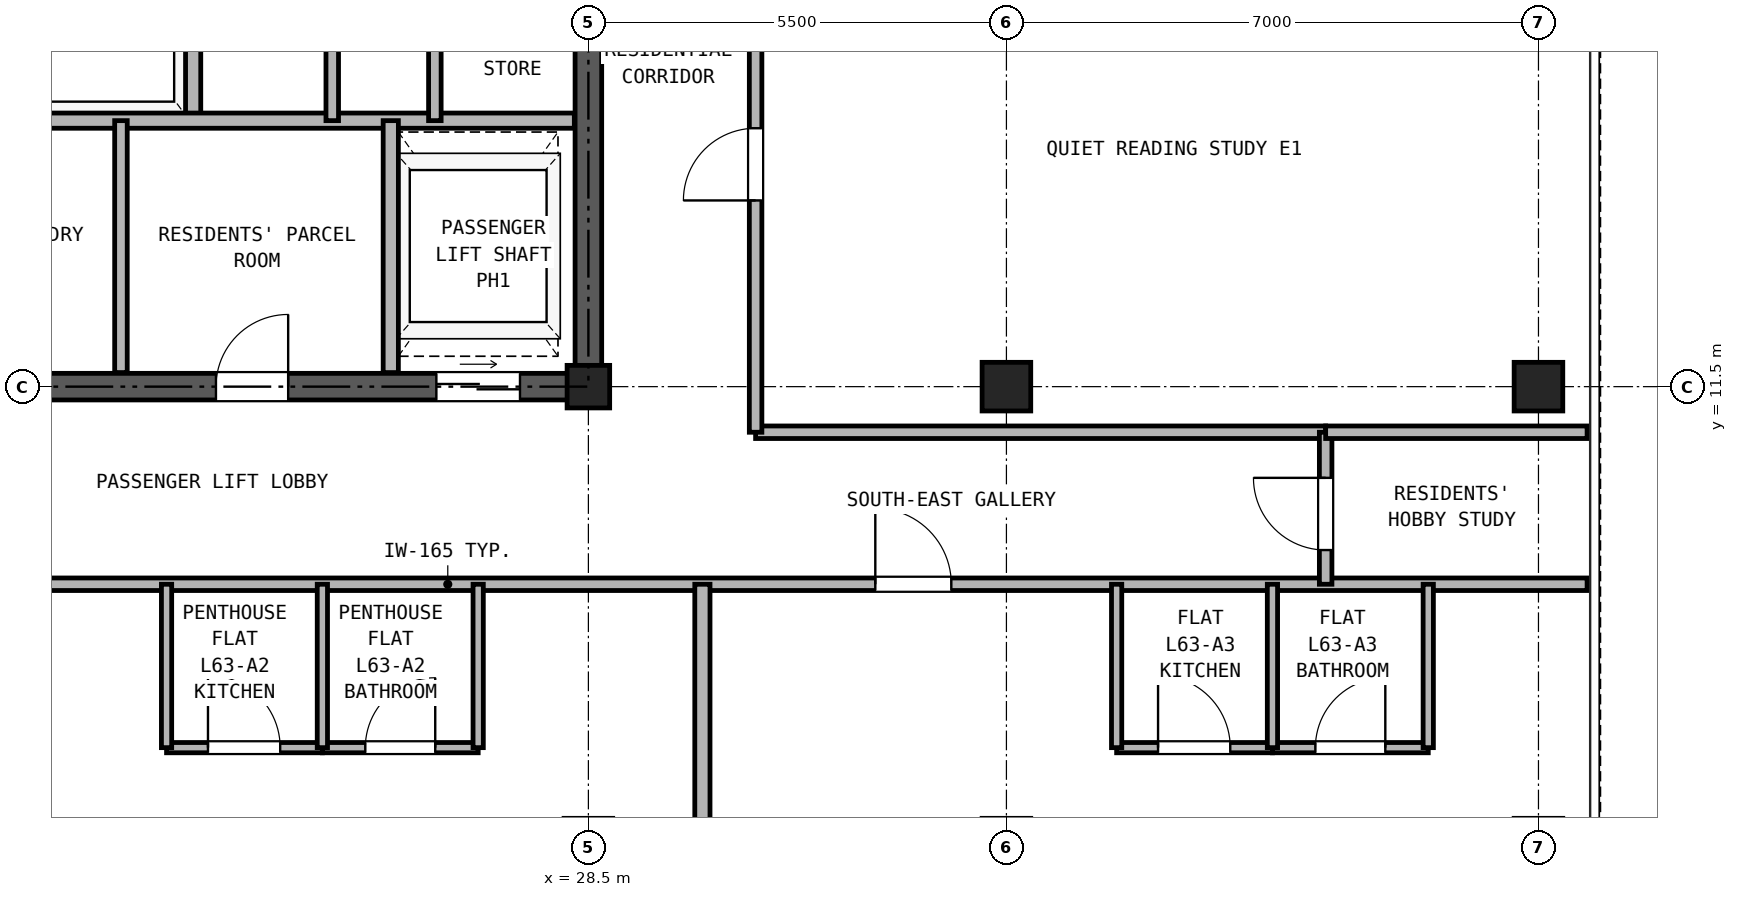
"""IFC4 building model, lengths in metres.
Left out: names, types, materials, properties, quantities, classifications, styles, units other than length and angle.
Written with IfcOpenShell. Run it as: python <this file> out.ifc"""

import sys

from ifc_helpers import new_model, si_unit, direction, frame, frame_2d, origin, origin_2d, place, context, subcontext, project, spatial, rectangle, hollow_rectangle, extrude, source, transform, mapped, element, fill, save


model = new_model("IFC4")
c1 = context("Model", 3, precision=1e-05, world=origin(), true_north=direction((0.0, 1.0)))
c2 = subcontext(c1, "Body", "Model", "MODEL_VIEW")
j1 = project(units=[si_unit("LENGTHUNIT", "METRE"), si_unit("PLANEANGLEUNIT", "RADIAN")], contexts=[c1])
p1 = place(None, origin())
s1 = spatial("IfcSite", under=j1, at=p1, CompositionType="ELEMENT")
p2 = place(p1, origin())
s2 = spatial("IfcBuilding", under=s1, at=p2, CompositionType="ELEMENT")
p3 = place(p2, frame((0.0, 0.0, 223.3)))
s3 = spatial("IfcBuildingStorey", under=s2, at=p3, CompositionType="ELEMENT", Elevation=223.3)
m1 = source(origin(), c2, "Body", "SweptSolid", [
    extrude(hollow_rectangle(XDim=0.64, YDim=0.64, WallThickness=0.035, at=origin_2d()), origin(), (0.0, 0.0, 1.0), 2.98),
])
p4 = place(p3, frame((41.0, 11.5, 0.0), z_axis=(0.0, 0.0, 1.0), x_axis=(1.0, 0.0, 0.0)))
e1 = element("IfcColumn", 1, at=p4, inside=s3, PredefinedType="COLUMN", context=c2, shape_type="MappedRepresentation", body=[
    mapped(m1, transform((0.0, 0.0, 0.0), x_axis=(1.0, 0.0, 0.0), y_axis=(0.0, 1.0, 0.0), z_axis=(0.0, 0.0, 1.0), scale=1.0)),
])
m2 = source(origin(), c2, "Body", "SweptSolid", [
    extrude(hollow_rectangle(XDim=0.56, YDim=0.56, WallThickness=0.03, at=origin_2d()), origin(), (0.0, 0.0, 1.0), 2.98),
])
p5 = place(p3, frame((28.5, 11.5, 0.0), z_axis=(0.0, 0.0, 1.0), x_axis=(1.0, 0.0, 0.0)))
e2 = element("IfcColumn", 2, at=p5, inside=s3, PredefinedType="COLUMN", context=c2, shape_type="MappedRepresentation", body=[
    mapped(m2, transform((0.0, 0.0, 0.0), x_axis=(1.0, 0.0, 0.0), y_axis=(0.0, 1.0, 0.0), z_axis=(0.0, 0.0, 1.0), scale=1.0)),
])
p6 = place(p3, frame((34.0, 11.5, 0.0), z_axis=(0.0, 0.0, 1.0), x_axis=(1.0, 0.0, 0.0)))
e3 = element("IfcColumn", 3, at=p6, inside=s3, PredefinedType="COLUMN", context=c2, shape_type="MappedRepresentation", body=[
    mapped(m1, transform((0.0, 0.0, 0.0), x_axis=(1.0, 0.0, 0.0), y_axis=(0.0, 1.0, 0.0), z_axis=(0.0, 0.0, 1.0), scale=1.0)),
])
p7 = place(p3, frame((18.325, 11.5, 0.0), z_axis=(0.0, 0.0, 1.0), x_axis=(1.0, 0.0, 0.0)))
e4 = element("IfcWall", 4, at=p7, inside=s3, PredefinedType="SHEAR", context=c2, shape_type="SweptSolid", body=[
    extrude(rectangle(XDim=10.35, YDim=0.35, at=frame_2d((5.175, 0.0))), origin(), (0.0, 0.0, 1.0), 2.98),
])
p8 = place(p7, frame((1.775, 0.0, 0.0)))
e5 = element("IfcOpeningElement", 5, at=p8, cuts=e4, PredefinedType="OPENING", context=c2, shape_type="SweptSolid", body=[
    extrude(rectangle(XDim=0.95, YDim=2.15, at=frame_2d((0.475, 1.075))), frame((0.0, 0.185, 0.0), z_axis=(0.0, -1.0, 0.0), x_axis=(1.0, 0.0, 0.0)), (0.0, 0.0, 1.0), 0.37),
])
p9 = place(p7, frame((5.275, 0.0, 0.0)))
e6 = element("IfcOpeningElement", 6, at=p9, cuts=e4, PredefinedType="OPENING", context=c2, shape_type="SweptSolid", body=[
    extrude(rectangle(XDim=0.95, YDim=2.15, at=frame_2d((0.475, 1.075))), frame((0.0, 0.185, 0.0), z_axis=(0.0, -1.0, 0.0), x_axis=(1.0, 0.0, 0.0)), (0.0, 0.0, 1.0), 0.37),
])
p10 = place(p7, frame((8.175, 0.0, 0.0)))
e7 = element("IfcOpeningElement", 7, at=p10, cuts=e4, PredefinedType="OPENING", context=c2, shape_type="SweptSolid", body=[
    extrude(rectangle(XDim=1.1, YDim=2.25, at=frame_2d((0.55, 1.125))), frame((0.0, 0.185, 0.0), z_axis=(0.0, -1.0, 0.0), x_axis=(1.0, 0.0, 0.0)), (0.0, 0.0, 1.0), 0.37),
])
p11 = place(p3, frame((28.5, 11.675, 0.0), z_axis=(0.0, 0.0, 1.0), x_axis=(0.0, 1.0, 0.0)))
e8 = element("IfcWall", 8, at=p11, inside=s3, PredefinedType="SHEAR", context=c2, shape_type="SweptSolid", body=[
    extrude(rectangle(XDim=16.9, YDim=0.35, at=frame_2d((8.45, 0.0))), origin(), (0.0, 0.0, 1.0), 2.98),
])
p12 = place(p11, frame((7.475, 0.0, 0.0)))
e9 = element("IfcOpeningElement", 9, at=p12, cuts=e8, PredefinedType="OPENING", context=c2, shape_type="SweptSolid", body=[
    extrude(rectangle(XDim=1.15, YDim=2.2, at=frame_2d((0.575, 1.1))), frame((0.0, 0.185, 0.0), z_axis=(0.0, -1.0, 0.0), x_axis=(1.0, 0.0, 0.0)), (0.0, 0.0, 1.0), 0.37),
])
p13 = place(p3, frame((23.3, 15.0, 0.0), z_axis=(0.0, 0.0, 1.0), x_axis=(0.0, 1.0, 0.0)))
e10 = element("IfcWall", 10, at=p13, inside=s3, PredefinedType="PARTITIONING", context=c2, shape_type="SweptSolid", body=[
    extrude(rectangle(XDim=3.0, YDim=0.2, at=frame_2d((1.5, 0.0))), origin(), (0.0, 0.0, 1.0), 2.98),
])
p14 = place(p3, frame((18.685, 15.0, 0.0), z_axis=(0.0, 0.0, 1.0), x_axis=(1.0, 0.0, 0.0)))
e11 = element("IfcWall", 11, at=p14, inside=s3, PredefinedType="PARTITIONING", context=c2, shape_type="SweptSolid", body=[
    extrude(rectangle(XDim=9.63, YDim=0.2, at=frame_2d((4.815, 0.0))), origin(), (0.0, 0.0, 1.0), 2.98),
])
p15 = place(p3, frame((25.13, 15.0, 0.0), z_axis=(0.0, 0.0, 1.0), x_axis=(0.0, 1.0, 0.0)))
e12 = element("IfcWall", 12, at=p15, inside=s3, PredefinedType="PARTITIONING", context=c2, shape_type="SweptSolid", body=[
    extrude(rectangle(XDim=3.0, YDim=0.165, at=frame_2d((1.5, 0.0))), origin(), (0.0, 0.0, 1.0), 2.98),
])
p16 = place(p3, frame((26.48, 15.0, 0.0), z_axis=(0.0, 0.0, 1.0), x_axis=(0.0, 1.0, 0.0)))
e13 = element("IfcWall", 13, at=p16, inside=s3, PredefinedType="PARTITIONING", context=c2, shape_type="SweptSolid", body=[
    extrude(rectangle(XDim=3.0, YDim=0.165, at=frame_2d((1.5, 0.0))), origin(), (0.0, 0.0, 1.0), 2.98),
])
p17 = place(p16, frame((1.05, 0.0, 0.0)))
e14 = element("IfcOpeningElement", 14, at=p17, cuts=e13, PredefinedType="OPENING", context=c2, shape_type="SweptSolid", body=[
    extrude(rectangle(XDim=0.9, YDim=2.05, at=frame_2d((0.45, 1.025))), frame((0.0, 0.093, 0.0), z_axis=(0.0, -1.0, 0.0), x_axis=(1.0, 0.0, 0.0)), (0.0, 0.0, 1.0), 0.185),
])
p18 = place(p3, frame((22.35, 11.685, 0.0), z_axis=(0.0, 0.0, 1.0), x_axis=(0.0, 1.0, 0.0)))
e15 = element("IfcWall", 15, at=p18, inside=s3, PredefinedType="PARTITIONING", context=c2, shape_type="SweptSolid", body=[
    extrude(rectangle(XDim=3.315, YDim=0.165, at=frame_2d((1.657, 0.0))), origin(), (0.0, 0.0, 1.0), 2.98),
])
p19 = place(p3, frame((25.9, 11.685, 0.0), z_axis=(0.0, 0.0, 1.0), x_axis=(0.0, 1.0, 0.0)))
e16 = element("IfcWall", 16, at=p19, inside=s3, PredefinedType="PARTITIONING", context=c2, shape_type="SweptSolid", body=[
    extrude(rectangle(XDim=3.315, YDim=0.2, at=frame_2d((1.657, 0.0))), origin(), (0.0, 0.0, 1.0), 2.98),
])
p20 = place(p3, frame((5.36, 8.9, 0.0), z_axis=(0.0, 0.0, 1.0), x_axis=(1.0, 0.0, 0.0)))
e17 = element("IfcWall", 17, at=p20, inside=s3, PredefinedType="PARTITIONING", context=c2, shape_type="SweptSolid", body=[
    extrude(rectangle(XDim=36.28, YDim=0.165, at=frame_2d((18.14, 0.0))), origin(), (0.0, 0.0, 1.0), 2.98),
])
p21 = place(p20, frame((8.865, 0.0, 0.0)))
e18 = element("IfcOpeningElement", 18, at=p21, cuts=e17, PredefinedType="OPENING", context=c2, shape_type="SweptSolid", body=[
    extrude(rectangle(XDim=1.0, YDim=2.15, at=frame_2d((0.5, 1.075))), frame((0.0, 0.093, 0.0), z_axis=(0.0, -1.0, 0.0), x_axis=(1.0, 0.0, 0.0)), (0.0, 0.0, 1.0), 0.185),
])
p22 = place(p20, frame((14.665, 0.0, 0.0)))
e19 = element("IfcOpeningElement", 19, at=p22, cuts=e17, PredefinedType="OPENING", context=c2, shape_type="SweptSolid", body=[
    extrude(rectangle(XDim=1.0, YDim=2.15, at=frame_2d((0.5, 1.075))), frame((0.0, 0.093, 0.0), z_axis=(0.0, -1.0, 0.0), x_axis=(1.0, 0.0, 0.0)), (0.0, 0.0, 1.0), 0.185),
])
p23 = place(p20, frame((26.915, 0.0, 0.0)))
e20 = element("IfcOpeningElement", 20, at=p23, cuts=e17, PredefinedType="OPENING", context=c2, shape_type="SweptSolid", body=[
    extrude(rectangle(XDim=1.0, YDim=2.15, at=frame_2d((0.5, 1.075))), frame((0.0, 0.093, 0.0), z_axis=(0.0, -1.0, 0.0), x_axis=(1.0, 0.0, 0.0)), (0.0, 0.0, 1.0), 0.185),
])
p24 = place(p3, frame((30.7, 10.9, 0.0), z_axis=(0.0, 0.0, 1.0), x_axis=(1.0, 0.0, 0.0)))
e21 = element("IfcWall", 21, at=p24, inside=s3, PredefinedType="PARTITIONING", context=c2, shape_type="SweptSolid", body=[
    extrude(rectangle(XDim=7.5, YDim=0.165, at=frame_2d((3.75, 0.0))), origin(), (0.0, 0.0, 1.0), 2.98),
])
p25 = place(p3, frame((38.2, 8.9, 0.0), z_axis=(0.0, 0.0, 1.0), x_axis=(0.0, 1.0, 0.0)))
e22 = element("IfcWall", 22, at=p25, inside=s3, PredefinedType="PARTITIONING", context=c2, shape_type="SweptSolid", body=[
    extrude(rectangle(XDim=2.0, YDim=0.165, at=frame_2d((1.0, 0.0))), origin(), (0.0, 0.0, 1.0), 2.98),
])
p26 = place(p25, frame((0.45, 0.0, 0.0)))
e23 = element("IfcOpeningElement", 23, at=p26, cuts=e22, PredefinedType="OPENING", context=c2, shape_type="SweptSolid", body=[
    extrude(rectangle(XDim=0.95, YDim=2.15, at=frame_2d((0.475, 1.075))), frame((0.0, 0.093, 0.0), z_axis=(0.0, -1.0, 0.0), x_axis=(1.0, 0.0, 0.0)), (0.0, 0.0, 1.0), 0.185),
])
p27 = place(p3, frame((30.7, 10.9, 0.0), z_axis=(0.0, 0.0, 1.0), x_axis=(0.0, 1.0, 0.0)))
e24 = element("IfcWall", 24, at=p27, inside=s3, PredefinedType="PARTITIONING", context=c2, shape_type="SweptSolid", body=[
    extrude(rectangle(XDim=24.24, YDim=0.165, at=frame_2d((12.12, 0.0))), origin(), (0.0, 0.0, 1.0), 2.98),
])
p28 = place(p27, frame((3.05, 0.0, 0.0)))
e25 = element("IfcOpeningElement", 25, at=p28, cuts=e24, PredefinedType="OPENING", context=c2, shape_type="SweptSolid", body=[
    extrude(rectangle(XDim=0.95, YDim=2.15, at=frame_2d((0.475, 1.075))), frame((0.0, 0.093, 0.0), z_axis=(0.0, -1.0, 0.0), x_axis=(1.0, 0.0, 0.0)), (0.0, 0.0, 1.0), 0.185),
])
p29 = place(p27, frame((9.85, 0.0, 0.0)))
e26 = element("IfcOpeningElement", 26, at=p29, cuts=e24, PredefinedType="OPENING", context=c2, shape_type="SweptSolid", body=[
    extrude(rectangle(XDim=0.95, YDim=2.15, at=frame_2d((0.475, 1.075))), frame((0.0, 0.093, 0.0), z_axis=(0.0, -1.0, 0.0), x_axis=(1.0, 0.0, 0.0)), (0.0, 0.0, 1.0), 0.185),
])
p30 = place(p27, frame((15.95, 0.0, 0.0)))
e27 = element("IfcOpeningElement", 27, at=p30, cuts=e24, PredefinedType="OPENING", context=c2, shape_type="SweptSolid", body=[
    extrude(rectangle(XDim=0.95, YDim=2.15, at=frame_2d((0.475, 1.075))), frame((0.0, 0.093, 0.0), z_axis=(0.0, -1.0, 0.0), x_axis=(1.0, 0.0, 0.0)), (0.0, 0.0, 1.0), 0.185),
])
p31 = place(p27, frame((21.27, 0.0, 0.0)))
e28 = element("IfcOpeningElement", 28, at=p31, cuts=e24, PredefinedType="OPENING", context=c2, shape_type="SweptSolid", body=[
    extrude(rectangle(XDim=0.95, YDim=2.15, at=frame_2d((0.475, 1.075))), frame((0.0, 0.093, 0.0), z_axis=(0.0, -1.0, 0.0), x_axis=(1.0, 0.0, 0.0)), (0.0, 0.0, 1.0), 0.185),
])
p32 = place(p3, frame((22.95, 6.75, 0.0), z_axis=(0.0, 0.0, 1.0), x_axis=(1.0, 0.0, 0.0)))
e29 = element("IfcWall", 29, at=p32, inside=s3, PredefinedType="PARTITIONING", context=c2, shape_type="SweptSolid", body=[
    extrude(rectangle(XDim=2.05, YDim=0.135, at=frame_2d((1.025, 0.0))), origin(), (0.0, 0.0, 1.0), 2.98),
])
p33 = place(p32, frame((0.545, 0.0, 0.0)))
e30 = element("IfcOpeningElement", 30, at=p33, cuts=e29, PredefinedType="OPENING", context=c2, shape_type="SweptSolid", body=[
    extrude(rectangle(XDim=0.95, YDim=2.15, at=frame_2d((0.475, 1.075))), frame((0.0, 0.077, 0.0), z_axis=(0.0, -1.0, 0.0), x_axis=(1.0, 0.0, 0.0)), (0.0, 0.0, 1.0), 0.155),
])
p34 = place(p3, frame((25.0, 6.75, 0.0), z_axis=(0.0, 0.0, 1.0), x_axis=(1.0, 0.0, 0.0)))
e31 = element("IfcWall", 31, at=p34, inside=s3, PredefinedType="PARTITIONING", context=c2, shape_type="SweptSolid", body=[
    extrude(rectangle(XDim=2.05, YDim=0.135, at=frame_2d((1.025, 0.0))), origin(), (0.0, 0.0, 1.0), 2.98),
])
p35 = place(p34, frame((0.565, 0.0, 0.0)))
e32 = element("IfcOpeningElement", 32, at=p35, cuts=e31, PredefinedType="OPENING", context=c2, shape_type="SweptSolid", body=[
    extrude(rectangle(XDim=0.92, YDim=2.1, at=frame_2d((0.46, 1.05))), frame((0.0, 0.077, 0.0), z_axis=(0.0, -1.0, 0.0), x_axis=(1.0, 0.0, 0.0)), (0.0, 0.0, 1.0), 0.155),
])
for number, where, z_axis, x_axis in (
    (33, (22.95, 6.75, 0.0), (0.0, 0.0, 1.0), (0.0, 1.0, 0.0)),
    (34, (25.0, 6.75, 0.0), (0.0, 0.0, 1.0), (0.0, 1.0, 0.0)),
    (35, (27.05, 6.75, 0.0), (0.0, 0.0, 1.0), (0.0, 1.0, 0.0)),
):
    element("IfcWall", number, at=place(p3, frame(where, z_axis=z_axis, x_axis=x_axis)), inside=s3, PredefinedType="PARTITIONING", context=c2, shape_type="SweptSolid", body=[
        extrude(rectangle(XDim=2.15, YDim=0.135, at=frame_2d((1.075, 0.0))), origin(), (0.0, 0.0, 1.0), 2.98),
    ])
p36 = place(p3, frame((30.0, 0.16, 0.0), z_axis=(0.0, 0.0, 1.0), x_axis=(0.0, 1.0, 0.0)))
e36 = element("IfcWall", 36, at=p36, inside=s3, PredefinedType="PARTITIONING", context=c2, shape_type="SweptSolid", body=[
    extrude(rectangle(XDim=8.74, YDim=0.2, at=frame_2d((4.37, 0.0))), origin(), (0.0, 0.0, 1.0), 2.98),
])
p37 = place(p3, frame((35.45, 6.75, 0.0), z_axis=(0.0, 0.0, 1.0), x_axis=(1.0, 0.0, 0.0)))
e37 = element("IfcWall", 37, at=p37, inside=s3, PredefinedType="PARTITIONING", context=c2, shape_type="SweptSolid", body=[
    extrude(rectangle(XDim=2.05, YDim=0.135, at=frame_2d((1.025, 0.0))), origin(), (0.0, 0.0, 1.0), 2.98),
])
p38 = place(p37, frame((0.545, 0.0, 0.0)))
e38 = element("IfcOpeningElement", 38, at=p38, cuts=e37, PredefinedType="OPENING", context=c2, shape_type="SweptSolid", body=[
    extrude(rectangle(XDim=0.95, YDim=2.15, at=frame_2d((0.475, 1.075))), frame((0.0, 0.077, 0.0), z_axis=(0.0, -1.0, 0.0), x_axis=(1.0, 0.0, 0.0)), (0.0, 0.0, 1.0), 0.155),
])
p39 = place(p3, frame((37.5, 6.75, 0.0), z_axis=(0.0, 0.0, 1.0), x_axis=(1.0, 0.0, 0.0)))
e39 = element("IfcWall", 39, at=p39, inside=s3, PredefinedType="PARTITIONING", context=c2, shape_type="SweptSolid", body=[
    extrude(rectangle(XDim=2.05, YDim=0.135, at=frame_2d((1.025, 0.0))), origin(), (0.0, 0.0, 1.0), 2.98),
])
p40 = place(p39, frame((0.565, 0.0, 0.0)))
e40 = element("IfcOpeningElement", 40, at=p40, cuts=e39, PredefinedType="OPENING", context=c2, shape_type="SweptSolid", body=[
    extrude(rectangle(XDim=0.92, YDim=2.1, at=frame_2d((0.46, 1.05))), frame((0.0, 0.077, 0.0), z_axis=(0.0, -1.0, 0.0), x_axis=(1.0, 0.0, 0.0)), (0.0, 0.0, 1.0), 0.155),
])
for number, where, z_axis, x_axis in (
    (41, (35.45, 6.75, 0.0), (0.0, 0.0, 1.0), (0.0, 1.0, 0.0)),
    (42, (37.5, 6.75, 0.0), (0.0, 0.0, 1.0), (0.0, 1.0, 0.0)),
    (43, (39.55, 6.75, 0.0), (0.0, 0.0, 1.0), (0.0, 1.0, 0.0)),
):
    element("IfcWall", number, at=place(p3, frame(where, z_axis=z_axis, x_axis=x_axis)), inside=s3, PredefinedType="PARTITIONING", context=c2, shape_type="SweptSolid", body=[
        extrude(rectangle(XDim=2.15, YDim=0.135, at=frame_2d((1.075, 0.0))), origin(), (0.0, 0.0, 1.0), 2.98),
    ])
p41 = place(p3, frame((38.2, 10.9, 0.0), z_axis=(0.0, 0.0, 1.0), x_axis=(1.0, 0.0, 0.0)))
e44 = element("IfcWall", 44, at=p41, inside=s3, PredefinedType="PARTITIONING", context=c2, shape_type="SweptSolid", body=[
    extrude(rectangle(XDim=3.44, YDim=0.165, at=frame_2d((1.72, 0.0))), origin(), (0.0, 0.0, 1.0), 2.98),
])
p42 = place(p9, frame((0.95, 0.0, 0.0), z_axis=(0.0, 0.0, 1.0), x_axis=(-1.0, 0.0, 0.0)))
e45 = element("IfcDoor", 45, at=p42, inside=s3, OperationType="SINGLE_SWING_RIGHT", PredefinedType="DOOR", context=c2, shape_type="SweptSolid", body=[
    extrude(rectangle(XDim=0.95, YDim=2.15, at=frame_2d((0.475, 1.075))), frame((0.0, 0.025, 0.0), z_axis=(0.0, -1.0, 0.0), x_axis=(1.0, 0.0, 0.0)), (0.0, 0.0, 1.0), 0.05),
])
fill(e6, e45)
p43 = place(p10, frame((1.1, 0.0, 0.0), z_axis=(0.0, 0.0, 1.0), x_axis=(-1.0, 0.0, 0.0)))
e46 = element("IfcDoor", 46, at=p43, inside=s3, OperationType="DOUBLE_DOOR_SLIDING", PredefinedType="DOOR", context=c2, shape_type="SweptSolid", body=[
    extrude(rectangle(XDim=1.1, YDim=2.25, at=frame_2d((0.55, 1.125))), frame((0.0, 0.025, 0.0), z_axis=(0.0, -1.0, 0.0), x_axis=(1.0, 0.0, 0.0)), (0.0, 0.0, 1.0), 0.05),
])
fill(e7, e46)
p44 = place(p33, origin())
e47 = element("IfcDoor", 47, at=p44, inside=s3, OperationType="SINGLE_SWING_LEFT", PredefinedType="DOOR", context=c2, shape_type="SweptSolid", body=[
    extrude(rectangle(XDim=0.95, YDim=2.15, at=frame_2d((0.475, 1.075))), frame((0.0, 0.025, 0.0), z_axis=(0.0, -1.0, 0.0), x_axis=(1.0, 0.0, 0.0)), (0.0, 0.0, 1.0), 0.05),
])
fill(e30, e47)
p45 = place(p35, origin())
e48 = element("IfcDoor", 48, at=p45, inside=s3, OperationType="SINGLE_SWING_RIGHT", PredefinedType="DOOR", context=c2, shape_type="SweptSolid", body=[
    extrude(rectangle(XDim=0.92, YDim=2.1, at=frame_2d((0.46, 1.05))), frame((0.0, 0.025, 0.0), z_axis=(0.0, -1.0, 0.0), x_axis=(1.0, 0.0, 0.0)), (0.0, 0.0, 1.0), 0.05),
])
fill(e32, e48)
p46 = place(p38, origin())
e49 = element("IfcDoor", 49, at=p46, inside=s3, OperationType="SINGLE_SWING_LEFT", PredefinedType="DOOR", context=c2, shape_type="SweptSolid", body=[
    extrude(rectangle(XDim=0.95, YDim=2.15, at=frame_2d((0.475, 1.075))), frame((0.0, 0.025, 0.0), z_axis=(0.0, -1.0, 0.0), x_axis=(1.0, 0.0, 0.0)), (0.0, 0.0, 1.0), 0.05),
])
fill(e38, e49)
p47 = place(p40, origin())
e50 = element("IfcDoor", 50, at=p47, inside=s3, OperationType="SINGLE_SWING_RIGHT", PredefinedType="DOOR", context=c2, shape_type="SweptSolid", body=[
    extrude(rectangle(XDim=0.92, YDim=2.1, at=frame_2d((0.46, 1.05))), frame((0.0, 0.025, 0.0), z_axis=(0.0, -1.0, 0.0), x_axis=(1.0, 0.0, 0.0)), (0.0, 0.0, 1.0), 0.05),
])
fill(e40, e50)
p48 = place(p23, frame((1.0, 0.0, 0.0), z_axis=(0.0, 0.0, 1.0), x_axis=(-1.0, 0.0, 0.0)))
e51 = element("IfcDoor", 51, at=p48, inside=s3, OperationType="SINGLE_SWING_LEFT", PredefinedType="DOOR", context=c2, shape_type="SweptSolid", body=[
    extrude(rectangle(XDim=1.0, YDim=2.15, at=frame_2d((0.5, 1.075))), frame((0.0, 0.025, 0.0), z_axis=(0.0, -1.0, 0.0), x_axis=(1.0, 0.0, 0.0)), (0.0, 0.0, 1.0), 0.05),
])
fill(e20, e51)
p49 = place(p26, origin())
e52 = element("IfcDoor", 52, at=p49, inside=s3, OperationType="SINGLE_SWING_RIGHT", PredefinedType="DOOR", context=c2, shape_type="SweptSolid", body=[
    extrude(rectangle(XDim=0.95, YDim=2.15, at=frame_2d((0.475, 1.075))), frame((0.0, 0.025, 0.0), z_axis=(0.0, -1.0, 0.0), x_axis=(1.0, 0.0, 0.0)), (0.0, 0.0, 1.0), 0.05),
])
fill(e23, e52)
p50 = place(p28, origin())
e53 = element("IfcDoor", 53, at=p50, inside=s3, OperationType="SINGLE_SWING_LEFT", PredefinedType="DOOR", context=c2, shape_type="SweptSolid", body=[
    extrude(rectangle(XDim=0.95, YDim=2.15, at=frame_2d((0.475, 1.075))), frame((0.0, 0.025, 0.0), z_axis=(0.0, -1.0, 0.0), x_axis=(1.0, 0.0, 0.0)), (0.0, 0.0, 1.0), 0.05),
])
fill(e25, e53)
save(model, sys.argv[1])
